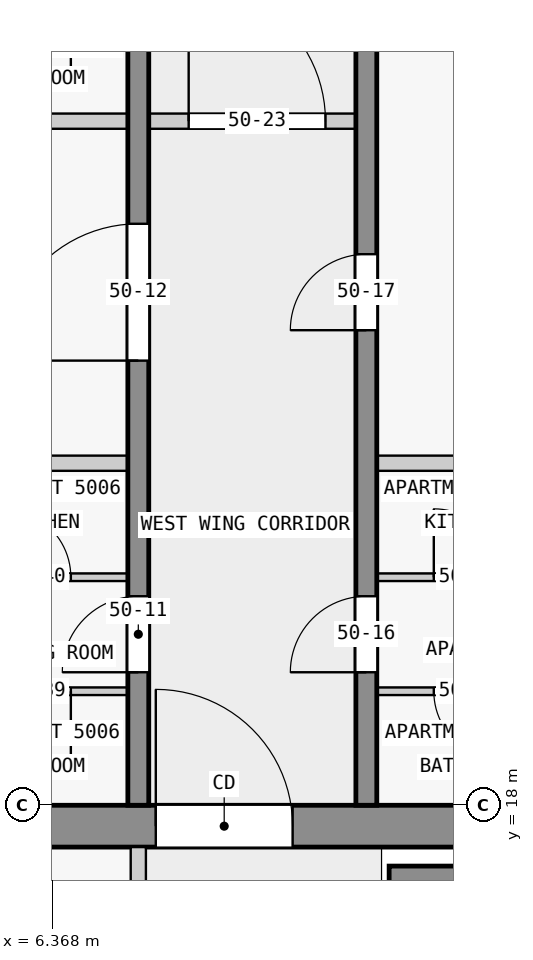
"""IFC4 building model, lengths in metres.
Left out: names, types, materials, properties, quantities, classifications, styles, units other than length and angle.
Written with IfcOpenShell. Run it as: python <this file> out.ifc"""

import sys

from ifc_helpers import new_model, si_unit, direction, frame, frame_2d, origin, place, context, subcontext, project, spatial, rectangle, extrude, element, fill, save


model = new_model("IFC4")
c1 = context("Model", 3, precision=1e-05, world=origin(), true_north=direction((0.0, 1.0)))
c2 = subcontext(c1, "Body", "Model", "MODEL_VIEW")
j1 = project(units=[si_unit("LENGTHUNIT", "METRE"), si_unit("PLANEANGLEUNIT", "RADIAN")], contexts=[c1])
p1 = place(None, origin())
s1 = spatial("IfcSite", under=j1, at=p1, CompositionType="ELEMENT")
p2 = place(p1, origin())
s2 = spatial("IfcBuilding", under=s1, at=p2, CompositionType="ELEMENT")
p3 = place(p2, frame((0.0, 0.0, 194.4)))
s3 = spatial("IfcBuildingStorey", under=s2, at=p3, CompositionType="ELEMENT", Elevation=194.4)
p4 = place(p3, frame((1.38, 17.725, 0.0), z_axis=(0.0, 0.0, 1.0), x_axis=(1.0, 0.0, 0.0)))
e1 = element("IfcWall", 1, at=p4, inside=s3, PredefinedType="SHEAR", context=c2, shape_type="SweptSolid", body=[
    extrude(rectangle(XDim=21.12, YDim=0.55, at=frame_2d((10.56, 0.0))), origin(), (0.0, 0.0, 1.0), 3.25),
])
p5 = place(p4, frame((6.35, 0.0, 0.0)))
e2 = element("IfcOpeningElement", 2, at=p5, cuts=e1, PredefinedType="OPENING", context=c2, shape_type="SweptSolid", body=[
    extrude(rectangle(XDim=1.8, YDim=2.1, at=frame_2d((0.9, 1.05))), frame((0.0, 0.285, 0.0), z_axis=(0.0, -1.0, 0.0), x_axis=(1.0, 0.0, 0.0)), (0.0, 0.0, 1.0), 0.57),
])
p6 = place(p3, frame((10.8, 17.05, 0.0), z_axis=(0.0, 0.0, 1.0), x_axis=(1.0, 0.0, 0.0)))
e3 = element("IfcWall", 3, at=p6, inside=s3, PredefinedType="SHEAR", context=c2, shape_type="SweptSolid", body=[
    extrude(rectangle(XDim=7.8, YDim=0.3, at=frame_2d((3.9, 0.0))), origin(), (0.0, 0.0, 1.0), 3.25),
])
p7 = place(p3, frame((7.5, 18.0, 0.0), z_axis=(0.0, 0.0, 1.0), x_axis=(0.0, 1.0, 0.0)))
e4 = element("IfcWall", 4, at=p7, inside=s3, PredefinedType="SHEAR", context=c2, shape_type="SweptSolid", body=[
    extrude(rectangle(XDim=27.0, YDim=0.275, at=frame_2d((13.5, 0.0))), origin(), (0.0, 0.0, 1.0), 3.25),
])
p8 = place(p7, frame((1.75, 0.0, 0.0)))
e5 = element("IfcOpeningElement", 5, at=p8, cuts=e4, PredefinedType="OPENING", context=c2, shape_type="SweptSolid", body=[
    extrude(rectangle(XDim=1.0, YDim=2.1, at=frame_2d((0.5, 1.05))), frame((0.0, 0.147, 0.0), z_axis=(0.0, -1.0, 0.0), x_axis=(1.0, 0.0, 0.0)), (0.0, 0.0, 1.0), 0.295),
])
p9 = place(p7, frame((5.85, 0.0, 0.0)))
e6 = element("IfcOpeningElement", 6, at=p9, cuts=e4, PredefinedType="OPENING", context=c2, shape_type="SweptSolid", body=[
    extrude(rectangle(XDim=1.8, YDim=2.1, at=frame_2d((0.9, 1.05))), frame((0.0, 0.147, 0.0), z_axis=(0.0, -1.0, 0.0), x_axis=(1.0, 0.0, 0.0)), (0.0, 0.0, 1.0), 0.295),
])
p10 = place(p7, frame((10.75, 0.0, 0.0)))
e7 = element("IfcOpeningElement", 7, at=p10, cuts=e4, PredefinedType="OPENING", context=c2, shape_type="SweptSolid", body=[
    extrude(rectangle(XDim=1.0, YDim=2.1, at=frame_2d((0.5, 1.05))), frame((0.0, 0.147, 0.0), z_axis=(0.0, -1.0, 0.0), x_axis=(1.0, 0.0, 0.0)), (0.0, 0.0, 1.0), 0.295),
])
p11 = place(p7, frame((15.25, 0.0, 0.0)))
e8 = element("IfcOpeningElement", 8, at=p11, cuts=e4, PredefinedType="OPENING", context=c2, shape_type="SweptSolid", body=[
    extrude(rectangle(XDim=1.0, YDim=2.1, at=frame_2d((0.5, 1.05))), frame((0.0, 0.147, 0.0), z_axis=(0.0, -1.0, 0.0), x_axis=(1.0, 0.0, 0.0)), (0.0, 0.0, 1.0), 0.295),
])
p12 = place(p7, frame((21.35, 0.0, 0.0)))
e9 = element("IfcOpeningElement", 9, at=p12, cuts=e4, PredefinedType="OPENING", context=c2, shape_type="SweptSolid", body=[
    extrude(rectangle(XDim=1.0, YDim=2.1, at=frame_2d((0.5, 1.05))), frame((0.0, 0.147, 0.0), z_axis=(0.0, -1.0, 0.0), x_axis=(1.0, 0.0, 0.0)), (0.0, 0.0, 1.0), 0.295),
])
p13 = place(p3, frame((10.5, 18.0, 0.0), z_axis=(0.0, 0.0, 1.0), x_axis=(0.0, 1.0, 0.0)))
e10 = element("IfcWall", 10, at=p13, inside=s3, PredefinedType="SHEAR", context=c2, shape_type="SweptSolid", body=[
    extrude(rectangle(XDim=27.0, YDim=0.275, at=frame_2d((13.5, 0.0))), origin(), (0.0, 0.0, 1.0), 3.25),
])
p14 = place(p13, frame((1.75, 0.0, 0.0)))
e11 = element("IfcOpeningElement", 11, at=p14, cuts=e10, PredefinedType="OPENING", context=c2, shape_type="SweptSolid", body=[
    extrude(rectangle(XDim=1.0, YDim=2.1, at=frame_2d((0.5, 1.05))), frame((0.0, 0.147, 0.0), z_axis=(0.0, -1.0, 0.0), x_axis=(1.0, 0.0, 0.0)), (0.0, 0.0, 1.0), 0.295),
])
p15 = place(p13, frame((6.25, 0.0, 0.0)))
e12 = element("IfcOpeningElement", 12, at=p15, cuts=e10, PredefinedType="OPENING", context=c2, shape_type="SweptSolid", body=[
    extrude(rectangle(XDim=1.0, YDim=2.1, at=frame_2d((0.5, 1.05))), frame((0.0, 0.147, 0.0), z_axis=(0.0, -1.0, 0.0), x_axis=(1.0, 0.0, 0.0)), (0.0, 0.0, 1.0), 0.295),
])
p16 = place(p13, frame((15.25, 0.0, 0.0)))
e13 = element("IfcOpeningElement", 13, at=p16, cuts=e10, PredefinedType="OPENING", context=c2, shape_type="SweptSolid", body=[
    extrude(rectangle(XDim=1.0, YDim=2.1, at=frame_2d((0.5, 1.05))), frame((0.0, 0.147, 0.0), z_axis=(0.0, -1.0, 0.0), x_axis=(1.0, 0.0, 0.0)), (0.0, 0.0, 1.0), 0.295),
])
p17 = place(p13, frame((19.75, 0.0, 0.0)))
e14 = element("IfcOpeningElement", 14, at=p17, cuts=e10, PredefinedType="OPENING", context=c2, shape_type="SweptSolid", body=[
    extrude(rectangle(XDim=1.0, YDim=2.1, at=frame_2d((0.5, 1.05))), frame((0.0, 0.147, 0.0), z_axis=(0.0, -1.0, 0.0), x_axis=(1.0, 0.0, 0.0)), (0.0, 0.0, 1.0), 0.295),
])
p18 = place(p13, frame((23.25, 0.0, 0.0)))
e15 = element("IfcOpeningElement", 15, at=p18, cuts=e10, PredefinedType="OPENING", context=c2, shape_type="SweptSolid", body=[
    extrude(rectangle(XDim=0.9, YDim=2.1, at=frame_2d((0.45, 1.05))), frame((0.0, 0.147, 0.0), z_axis=(0.0, -1.0, 0.0), x_axis=(1.0, 0.0, 0.0)), (0.0, 0.0, 1.0), 0.295),
])
p19 = place(p13, frame((25.45, 0.0, 0.0)))
e16 = element("IfcOpeningElement", 16, at=p19, cuts=e10, PredefinedType="OPENING", context=c2, shape_type="SweptSolid", body=[
    extrude(rectangle(XDim=1.0, YDim=2.1, at=frame_2d((0.5, 1.05))), frame((0.0, 0.147, 0.0), z_axis=(0.0, -1.0, 0.0), x_axis=(1.0, 0.0, 0.0)), (0.0, 0.0, 1.0), 0.295),
])
p20 = place(p3, frame((7.5, 10.1, 0.0), z_axis=(0.0, 0.0, 1.0), x_axis=(0.0, 1.0, 0.0)))
e17 = element("IfcWall", 17, at=p20, inside=s3, PredefinedType="PARTITIONING", context=c2, shape_type="SweptSolid", body=[
    extrude(rectangle(XDim=7.35, YDim=0.2, at=frame_2d((3.675, 0.0))), origin(), (0.0, 0.0, 1.0), 3.25),
])
p21 = place(p20, frame((0.8, 0.0, 0.0)))
e18 = element("IfcOpeningElement", 18, at=p21, cuts=e17, PredefinedType="OPENING", context=c2, shape_type="SweptSolid", body=[
    extrude(rectangle(XDim=0.9, YDim=2.1, at=frame_2d((0.45, 1.05))), frame((0.0, 0.11, 0.0), z_axis=(0.0, -1.0, 0.0), x_axis=(1.0, 0.0, 0.0)), (0.0, 0.0, 1.0), 0.22),
])
p22 = place(p20, frame((3.3, 0.0, 0.0)))
e19 = element("IfcOpeningElement", 19, at=p22, cuts=e17, PredefinedType="OPENING", context=c2, shape_type="SweptSolid", body=[
    extrude(rectangle(XDim=0.9, YDim=2.1, at=frame_2d((0.45, 1.05))), frame((0.0, 0.11, 0.0), z_axis=(0.0, -1.0, 0.0), x_axis=(1.0, 0.0, 0.0)), (0.0, 0.0, 1.0), 0.22),
])
p23 = place(p20, frame((5.25, 0.0, 0.0)))
e20 = element("IfcOpeningElement", 20, at=p23, cuts=e17, PredefinedType="OPENING", context=c2, shape_type="SweptSolid", body=[
    extrude(rectangle(XDim=0.9, YDim=2.1, at=frame_2d((0.45, 1.05))), frame((0.0, 0.11, 0.0), z_axis=(0.0, -1.0, 0.0), x_axis=(1.0, 0.0, 0.0)), (0.0, 0.0, 1.0), 0.22),
])
p24 = place(p3, frame((7.363, 19.5, 0.0), z_axis=(0.0, 0.0, 1.0), x_axis=(-1.0, 0.0, 0.0)))
e21 = element("IfcWall", 21, at=p24, inside=s3, PredefinedType="PARTITIONING", context=c2, shape_type="SweptSolid", body=[
    extrude(rectangle(XDim=2.4, YDim=0.1, at=frame_2d((1.2, 0.0))), origin(), (0.0, 0.0, 1.0), 3.25),
])
p25 = place(p24, frame((0.75, 0.0, 0.0)))
e22 = element("IfcOpeningElement", 22, at=p25, cuts=e21, PredefinedType="OPENING", context=c2, shape_type="SweptSolid", body=[
    extrude(rectangle(XDim=0.9, YDim=2.1, at=frame_2d((0.45, 1.05))), frame((0.0, 0.06, 0.0), z_axis=(0.0, -1.0, 0.0), x_axis=(1.0, 0.0, 0.0)), (0.0, 0.0, 1.0), 0.12),
])
p26 = place(p3, frame((13.038, 19.5, 0.0), z_axis=(0.0, 0.0, 1.0), x_axis=(-1.0, 0.0, 0.0)))
e23 = element("IfcWall", 23, at=p26, inside=s3, PredefinedType="PARTITIONING", context=c2, shape_type="SweptSolid", body=[
    extrude(rectangle(XDim=2.4, YDim=0.1, at=frame_2d((1.2, 0.0))), origin(), (0.0, 0.0, 1.0), 3.25),
])
p27 = place(p26, frame((0.75, 0.0, 0.0)))
e24 = element("IfcOpeningElement", 24, at=p27, cuts=e23, PredefinedType="OPENING", context=c2, shape_type="SweptSolid", body=[
    extrude(rectangle(XDim=0.9, YDim=2.1, at=frame_2d((0.45, 1.05))), frame((0.0, 0.06, 0.0), z_axis=(0.0, -1.0, 0.0), x_axis=(1.0, 0.0, 0.0)), (0.0, 0.0, 1.0), 0.12),
])
p28 = place(p3, frame((4.962, 21.0, 0.0), z_axis=(0.0, 0.0, 1.0), x_axis=(1.0, 0.0, 0.0)))
e25 = element("IfcWall", 25, at=p28, inside=s3, PredefinedType="PARTITIONING", context=c2, shape_type="SweptSolid", body=[
    extrude(rectangle(XDim=2.4, YDim=0.1, at=frame_2d((1.2, 0.0))), origin(), (0.0, 0.0, 1.0), 3.25),
])
p29 = place(p28, frame((0.75, 0.0, 0.0)))
e26 = element("IfcOpeningElement", 26, at=p29, cuts=e25, PredefinedType="OPENING", context=c2, shape_type="SweptSolid", body=[
    extrude(rectangle(XDim=0.9, YDim=2.1, at=frame_2d((0.45, 1.05))), frame((0.0, 0.06, 0.0), z_axis=(0.0, -1.0, 0.0), x_axis=(1.0, 0.0, 0.0)), (0.0, 0.0, 1.0), 0.12),
])
p30 = place(p3, frame((10.637, 21.0, 0.0), z_axis=(0.0, 0.0, 1.0), x_axis=(1.0, 0.0, 0.0)))
e27 = element("IfcWall", 27, at=p30, inside=s3, PredefinedType="PARTITIONING", context=c2, shape_type="SweptSolid", body=[
    extrude(rectangle(XDim=2.4, YDim=0.1, at=frame_2d((1.2, 0.0))), origin(), (0.0, 0.0, 1.0), 3.25),
])
p31 = place(p30, frame((0.75, 0.0, 0.0)))
e28 = element("IfcOpeningElement", 28, at=p31, cuts=e27, PredefinedType="OPENING", context=c2, shape_type="SweptSolid", body=[
    extrude(rectangle(XDim=0.9, YDim=2.1, at=frame_2d((0.45, 1.05))), frame((0.0, 0.06, 0.0), z_axis=(0.0, -1.0, 0.0), x_axis=(1.0, 0.0, 0.0)), (0.0, 0.0, 1.0), 0.12),
])
for number, where, z_axis, x_axis in (
    (29, (7.363, 22.5, 0.0), (0.0, 0.0, 1.0), (-1.0, 0.0, 0.0)),
    (30, (12.938, 22.5, 0.0), (0.0, 0.0, 1.0), (-1.0, 0.0, 0.0)),
):
    element("IfcWall", number, at=place(p3, frame(where, z_axis=z_axis, x_axis=x_axis)), inside=s3, PredefinedType="PARTITIONING", context=c2, shape_type="SweptSolid", body=[
        extrude(rectangle(XDim=2.3, YDim=0.2, at=frame_2d((1.15, 0.0))), origin(), (0.0, 0.0, 1.0), 3.25),
    ])
p32 = place(p3, frame((7.363, 27.0, 0.0), z_axis=(0.0, 0.0, 1.0), x_axis=(-1.0, 0.0, 0.0)))
e31 = element("IfcWall", 31, at=p32, inside=s3, PredefinedType="PARTITIONING", context=c2, shape_type="SweptSolid", body=[
    extrude(rectangle(XDim=7.443, YDim=0.2, at=frame_2d((3.721, 0.0))), origin(), (0.0, 0.0, 1.0), 3.25),
])
p33 = place(p3, frame((7.462, 27.0, 0.0), z_axis=(0.0, 0.0, 1.0), x_axis=(1.0, 0.0, 0.0)))
e32 = element("IfcWall", 32, at=p33, inside=s3, PredefinedType="PARTITIONING", context=c2, shape_type="SweptSolid", body=[
    extrude(rectangle(XDim=3.175, YDim=0.2, at=frame_2d((1.587, 0.0))), origin(), (0.0, 0.0, 1.0), 3.25),
])
p34 = place(p33, frame((0.7, 0.0, 0.0)))
e33 = element("IfcOpeningElement", 33, at=p34, cuts=e32, PredefinedType="OPENING", context=c2, shape_type="SweptSolid", body=[
    extrude(rectangle(XDim=1.8, YDim=2.1, at=frame_2d((0.9, 1.05))), frame((0.0, 0.11, 0.0), z_axis=(0.0, -1.0, 0.0), x_axis=(1.0, 0.0, 0.0)), (0.0, 0.0, 1.0), 0.22),
])
p35 = place(p5, origin())
e34 = element("IfcDoor", 34, at=p35, inside=s3, OperationType="DOUBLE_DOOR_SINGLE_SWING", PredefinedType="DOOR", context=c2, shape_type="SweptSolid", body=[
    extrude(rectangle(XDim=1.8, YDim=2.1, at=frame_2d((0.9, 1.05))), frame((0.0, 0.025, 0.0), z_axis=(0.0, -1.0, 0.0), x_axis=(1.0, 0.0, 0.0)), (0.0, 0.0, 1.0), 0.05),
])
fill(e2, e34)
p36 = place(p8, origin())
e35 = element("IfcDoor", 35, at=p36, inside=s3, OperationType="SINGLE_SWING_LEFT", PredefinedType="DOOR", context=c2, shape_type="SweptSolid", body=[
    extrude(rectangle(XDim=1.0, YDim=2.1, at=frame_2d((0.5, 1.05))), frame((0.0, 0.025, 0.0), z_axis=(0.0, -1.0, 0.0), x_axis=(1.0, 0.0, 0.0)), (0.0, 0.0, 1.0), 0.05),
])
fill(e5, e35)
p37 = place(p9, origin())
e36 = element("IfcDoor", 36, at=p37, inside=s3, OperationType="SINGLE_SWING_LEFT", PredefinedType="DOOR", context=c2, shape_type="SweptSolid", body=[
    extrude(rectangle(XDim=1.8, YDim=2.1, at=frame_2d((0.9, 1.05))), frame((0.0, 0.025, 0.0), z_axis=(0.0, -1.0, 0.0), x_axis=(1.0, 0.0, 0.0)), (0.0, 0.0, 1.0), 0.05),
])
fill(e6, e36)
p38 = place(p14, origin())
e37 = element("IfcDoor", 37, at=p38, inside=s3, OperationType="SINGLE_SWING_LEFT", PredefinedType="DOOR", context=c2, shape_type="SweptSolid", body=[
    extrude(rectangle(XDim=1.0, YDim=2.1, at=frame_2d((0.5, 1.05))), frame((0.0, 0.025, 0.0), z_axis=(0.0, -1.0, 0.0), x_axis=(1.0, 0.0, 0.0)), (0.0, 0.0, 1.0), 0.05),
])
fill(e11, e37)
p39 = place(p15, origin())
e38 = element("IfcDoor", 38, at=p39, inside=s3, OperationType="SINGLE_SWING_LEFT", PredefinedType="DOOR", context=c2, shape_type="SweptSolid", body=[
    extrude(rectangle(XDim=1.0, YDim=2.1, at=frame_2d((0.5, 1.05))), frame((0.0, 0.025, 0.0), z_axis=(0.0, -1.0, 0.0), x_axis=(1.0, 0.0, 0.0)), (0.0, 0.0, 1.0), 0.05),
])
fill(e12, e38)
p40 = place(p34, origin())
e39 = element("IfcDoor", 39, at=p40, inside=s3, OperationType="SINGLE_SWING_RIGHT", PredefinedType="DOOR", context=c2, shape_type="SweptSolid", body=[
    extrude(rectangle(XDim=1.8, YDim=2.1, at=frame_2d((0.9, 1.05))), frame((0.0, 0.025, 0.0), z_axis=(0.0, -1.0, 0.0), x_axis=(1.0, 0.0, 0.0)), (0.0, 0.0, 1.0), 0.05),
])
fill(e33, e39)
p41 = place(p25, origin())
e40 = element("IfcDoor", 40, at=p41, inside=s3, OperationType="SINGLE_SWING_RIGHT", PredefinedType="DOOR", context=c2, shape_type="SweptSolid", body=[
    extrude(rectangle(XDim=0.9, YDim=2.1, at=frame_2d((0.45, 1.05))), frame((0.0, 0.025, 0.0), z_axis=(0.0, -1.0, 0.0), x_axis=(1.0, 0.0, 0.0)), (0.0, 0.0, 1.0), 0.05),
])
fill(e22, e40)
p42 = place(p29, origin())
e41 = element("IfcDoor", 41, at=p42, inside=s3, OperationType="SINGLE_SWING_RIGHT", PredefinedType="DOOR", context=c2, shape_type="SweptSolid", body=[
    extrude(rectangle(XDim=0.9, YDim=2.1, at=frame_2d((0.45, 1.05))), frame((0.0, 0.025, 0.0), z_axis=(0.0, -1.0, 0.0), x_axis=(1.0, 0.0, 0.0)), (0.0, 0.0, 1.0), 0.05),
])
fill(e26, e41)
p43 = place(p27, origin())
e42 = element("IfcDoor", 42, at=p43, inside=s3, OperationType="SINGLE_SWING_LEFT", PredefinedType="DOOR", context=c2, shape_type="SweptSolid", body=[
    extrude(rectangle(XDim=0.9, YDim=2.1, at=frame_2d((0.45, 1.05))), frame((0.0, 0.025, 0.0), z_axis=(0.0, -1.0, 0.0), x_axis=(1.0, 0.0, 0.0)), (0.0, 0.0, 1.0), 0.05),
])
fill(e24, e42)
p44 = place(p31, origin())
e43 = element("IfcDoor", 43, at=p44, inside=s3, OperationType="SINGLE_SWING_LEFT", PredefinedType="DOOR", context=c2, shape_type="SweptSolid", body=[
    extrude(rectangle(XDim=0.9, YDim=2.1, at=frame_2d((0.45, 1.05))), frame((0.0, 0.025, 0.0), z_axis=(0.0, -1.0, 0.0), x_axis=(1.0, 0.0, 0.0)), (0.0, 0.0, 1.0), 0.05),
])
fill(e28, e43)
save(model, sys.argv[1])
